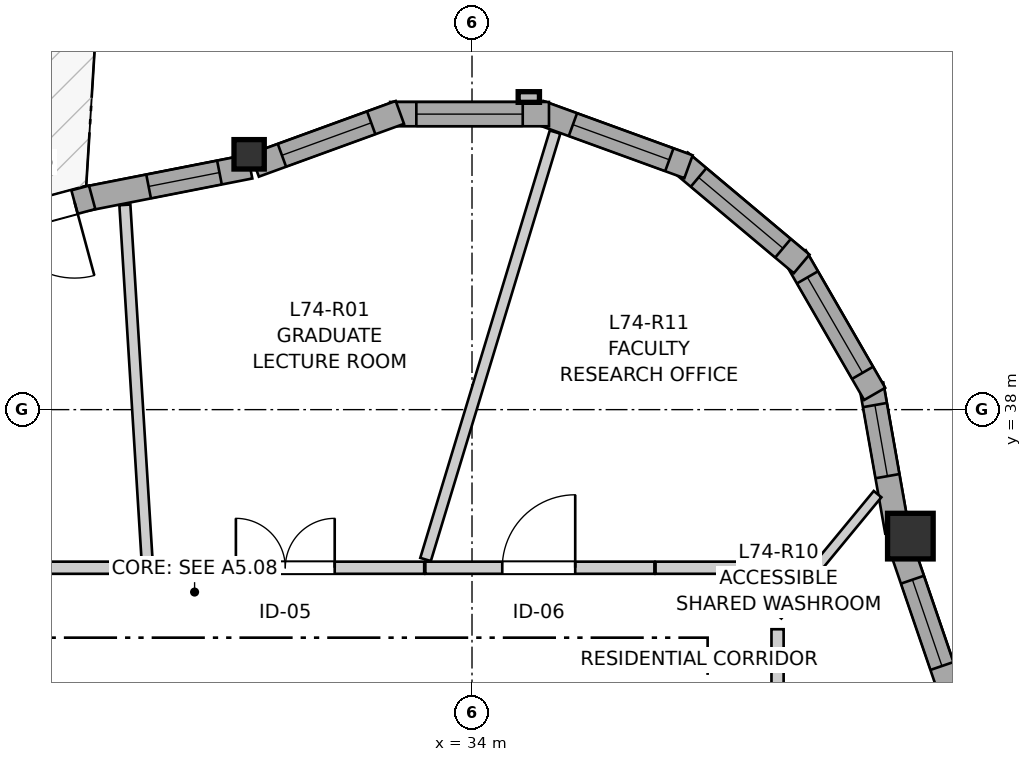
"""IFC4 building model, lengths in metres.
Left out: names, types, materials, properties, quantities, classifications, styles, units other than length and angle.
Written with IfcOpenShell. Run it as: python <this file> out.ifc"""

import sys

from ifc_helpers import new_model, si_unit, direction, frame, frame_2d, origin, origin_2d, place, context, subcontext, project, spatial, rectangle, i_section, extrude, source, transform, mapped, element, fill, save


model = new_model("IFC4")
c1 = context("Model", 3, precision=1e-05, world=origin(), true_north=direction((0.0, 1.0)))
c2 = subcontext(c1, "Body", "Model", "MODEL_VIEW")
j1 = project(units=[si_unit("LENGTHUNIT", "METRE"), si_unit("PLANEANGLEUNIT", "RADIAN")], contexts=[c1])
p1 = place(None, origin())
s1 = spatial("IfcSite", under=j1, at=p1, CompositionType="ELEMENT")
p2 = place(p1, origin())
s2 = spatial("IfcBuilding", under=s1, at=p2, CompositionType="ELEMENT")
p3 = place(p2, frame((0.0, 0.0, 246.8)))
s3 = spatial("IfcBuildingStorey", under=s2, at=p3, CompositionType="ELEMENT", Elevation=246.8)
m1 = source(origin(), c2, "Body", "SweptSolid", [
    extrude(rectangle(XDim=0.6, YDim=0.6, at=origin_2d()), origin(), (0.0, 0.0, 1.0), 2.96),
])
p4 = place(p3, frame((39.768, 36.336, 0.0), z_axis=(0.0, 0.0, 1.0), x_axis=(1.0, 0.0, 0.0)))
e1 = element("IfcColumn", 1, at=p4, inside=s3, PredefinedType="COLUMN", context=c2, shape_type="MappedRepresentation", body=[
    mapped(m1, transform((0.0, 0.0, 0.0), x_axis=(1.0, 0.0, 0.0), y_axis=(0.0, 1.0, 0.0), z_axis=(0.0, 0.0, 1.0), scale=1.0)),
])
m2 = source(origin(), c2, "Body", "SweptSolid", [
    extrude(i_section(OverallWidth=0.398, OverallDepth=0.387, WebThickness=0.019, FlangeThickness=0.03, FilletRadius=0.015, at=origin_2d()), origin(), (0.0, 0.0, 1.0), 2.96),
])
p5 = place(p3, frame((31.067, 41.359, 0.0), z_axis=(0.0, 0.0, 1.0), x_axis=(1.0, 0.0, 0.0)))
e2 = element("IfcColumn", 2, at=p5, inside=s3, PredefinedType="PILASTER", context=c2, shape_type="MappedRepresentation", body=[
    mapped(m2, transform((0.0, 0.0, 0.0), x_axis=(1.0, 0.0, 0.0), y_axis=(0.0, 1.0, 0.0), z_axis=(0.0, 0.0, 1.0), scale=1.0)),
])
p6 = place(p3, frame((40.335, 34.181, 0.0), z_axis=(0.0, 0.0, 1.0), x_axis=(-0.323601383087, 0.946193502865, 0.0)))
e3 = element("IfcWall", 3, at=p6, inside=s3, PredefinedType="SOLIDWALL", context=c2, shape_type="SweptSolid", body=[
    extrude(rectangle(XDim=2.133, YDim=0.32, at=frame_2d((1.066, 0.0))), origin(), (0.0, 0.0, 1.0), 2.58),
])
p7 = place(p6, frame((0.471, 0.0, 0.82)))
e4 = element("IfcOpeningElement", 4, at=p7, cuts=e3, PredefinedType="OPENING", context=c2, shape_type="SweptSolid", body=[
    extrude(rectangle(XDim=1.2, YDim=1.45, at=frame_2d((0.6, 0.725))), frame((0.0, 0.17, 0.0), z_axis=(0.0, -1.0, 0.0), x_axis=(1.0, 0.0, 0.0)), (0.0, 0.0, 1.0), 0.34),
])
p8 = place(p3, frame((39.594, 36.397, 0.0), z_axis=(0.0, 0.0, 1.0), x_axis=(-0.173671780312, 0.984803590937, 0.0)))
e5 = element("IfcWall", 5, at=p8, inside=s3, PredefinedType="SOLIDWALL", context=c2, shape_type="SweptSolid", body=[
    extrude(rectangle(XDim=1.962, YDim=0.32, at=frame_2d((0.981, 0.0))), origin(), (0.0, 0.0, 1.0), 2.58),
])
p9 = place(p8, frame((0.739, 0.0, 0.82)))
e6 = element("IfcOpeningElement", 6, at=p9, cuts=e5, PredefinedType="OPENING", context=c2, shape_type="SweptSolid", body=[
    extrude(rectangle(XDim=0.95, YDim=1.35, at=frame_2d((0.475, 0.675))), frame((0.0, 0.17, 0.0), z_axis=(0.0, -1.0, 0.0), x_axis=(1.0, 0.0, 0.0)), (0.0, 0.0, 1.0), 0.34),
])
p10 = place(p3, frame((39.298, 38.207, 0.0), z_axis=(0.0, 0.0, 1.0), x_axis=(-0.499995423472, 0.866028046028, 0.0)))
e7 = element("IfcWall", 7, at=p10, inside=s3, PredefinedType="SOLIDWALL", context=c2, shape_type="SweptSolid", body=[
    extrude(rectangle(XDim=2.09, YDim=0.32, at=frame_2d((1.045, 0.0))), origin(), (0.0, 0.0, 1.0), 2.58),
])
p11 = place(p10, frame((0.32, 0.0, 0.82)))
e8 = element("IfcOpeningElement", 8, at=p11, cuts=e7, PredefinedType="OPENING", context=c2, shape_type="SweptSolid", body=[
    extrude(rectangle(XDim=1.45, YDim=1.25, at=frame_2d((0.725, 0.625))), frame((0.0, 0.17, 0.0), z_axis=(0.0, -1.0, 0.0), x_axis=(1.0, 0.0, 0.0)), (0.0, 0.0, 1.0), 0.34),
])
p12 = place(p3, frame((38.337, 39.917, 0.0), z_axis=(0.0, 0.0, 1.0), x_axis=(-0.766024572719, 0.642811289563, 0.0)))
e9 = element("IfcWall", 9, at=p12, inside=s3, PredefinedType="SOLIDWALL", context=c2, shape_type="SweptSolid", body=[
    extrude(rectangle(XDim=2.09, YDim=0.32, at=frame_2d((1.045, 0.0))), origin(), (0.0, 0.0, 1.0), 2.58),
])
p13 = place(p12, frame((0.32, 0.0, 0.82)))
e10 = element("IfcOpeningElement", 10, at=p13, cuts=e9, PredefinedType="OPENING", context=c2, shape_type="SweptSolid", body=[
    extrude(rectangle(XDim=1.45, YDim=1.25, at=frame_2d((0.725, 0.625))), frame((0.0, 0.17, 0.0), z_axis=(0.0, -1.0, 0.0), x_axis=(1.0, 0.0, 0.0)), (0.0, 0.0, 1.0), 0.34),
])
p14 = place(p3, frame((36.848, 41.196, 0.0), z_axis=(0.0, 0.0, 1.0), x_axis=(-0.93973543134, 0.341902499383, 0.0)))
e11 = element("IfcWall", 11, at=p14, inside=s3, PredefinedType="SOLIDWALL", context=c2, shape_type="SweptSolid", body=[
    extrude(rectangle(XDim=2.09, YDim=0.32, at=frame_2d((1.045, 0.0))), origin(), (0.0, 0.0, 1.0), 2.58),
])
p15 = place(p14, frame((0.269, 0.0, 0.82)))
e12 = element("IfcOpeningElement", 12, at=p15, cuts=e11, PredefinedType="OPENING", context=c2, shape_type="SweptSolid", body=[
    extrude(rectangle(XDim=1.35, YDim=1.45, at=frame_2d((0.675, 0.725))), frame((0.0, 0.17, 0.0), z_axis=(0.0, -1.0, 0.0), x_axis=(1.0, 0.0, 0.0)), (0.0, 0.0, 1.0), 0.34),
])
p16 = place(p3, frame((35.013, 41.888, 0.0), z_axis=(0.0, 0.0, 1.0), x_axis=(-1.0, 0.0, 0.0)))
e13 = element("IfcWall", 13, at=p16, inside=s3, PredefinedType="SOLIDWALL", context=c2, shape_type="SweptSolid", body=[
    extrude(rectangle(XDim=2.09, YDim=0.32, at=frame_2d((1.045, 0.0))), origin(), (0.0, 0.0, 1.0), 2.58),
])
p17 = place(p16, frame((0.345, 0.0, 0.82)))
e14 = element("IfcOpeningElement", 14, at=p17, cuts=e13, PredefinedType="OPENING", context=c2, shape_type="SweptSolid", body=[
    extrude(rectangle(XDim=1.4, YDim=1.35, at=frame_2d((0.7, 0.675))), frame((0.0, 0.17, 0.0), z_axis=(0.0, -1.0, 0.0), x_axis=(1.0, 0.0, 0.0)), (0.0, 0.0, 1.0), 0.34),
])
p18 = place(p3, frame((33.051, 41.91, 0.0), z_axis=(0.0, 0.0, 1.0), x_axis=(-0.939730268502, -0.341916689358, 0.0)))
e15 = element("IfcWall", 15, at=p18, inside=s3, PredefinedType="SOLIDWALL", context=c2, shape_type="SweptSolid", body=[
    extrude(rectangle(XDim=2.032, YDim=0.32, at=frame_2d((1.016, 0.0))), origin(), (0.0, 0.0, 1.0), 2.58),
])
p19 = place(p18, frame((0.401, 0.0, 0.82)))
e16 = element("IfcOpeningElement", 16, at=p19, cuts=e15, PredefinedType="OPENING", context=c2, shape_type="SweptSolid", body=[
    extrude(rectangle(XDim=1.25, YDim=1.35, at=frame_2d((0.625, 0.675))), frame((0.0, 0.17, 0.0), z_axis=(0.0, -1.0, 0.0), x_axis=(1.0, 0.0, 0.0)), (0.0, 0.0, 1.0), 0.34),
])
p20 = place(p3, frame((31.079, 41.198, 0.0), z_axis=(0.0, 0.0, 1.0), x_axis=(-0.981223354781, -0.192874902544, 0.0)))
e17 = element("IfcWall", 17, at=p20, inside=s3, PredefinedType="SOLIDWALL", context=c2, shape_type="SweptSolid", body=[
    extrude(rectangle(XDim=2.202, YDim=0.32, at=frame_2d((1.101, 0.0))), origin(), (0.0, 0.0, 1.0), 2.58),
])
p21 = place(p20, frame((0.409, 0.0, 0.82)))
e18 = element("IfcOpeningElement", 18, at=p21, cuts=e17, PredefinedType="OPENING", context=c2, shape_type="SweptSolid", body=[
    extrude(rectangle(XDim=0.95, YDim=1.35, at=frame_2d((0.475, 0.675))), frame((0.0, 0.17, 0.0), z_axis=(0.0, -1.0, 0.0), x_axis=(1.0, 0.0, 0.0)), (0.0, 0.0, 1.0), 0.34),
])
p22 = place(p3, frame((29.002, 40.793, 0.0), z_axis=(0.0, 0.0, 1.0), x_axis=(-0.965467637734, -0.260523013357, 0.0)))
e19 = element("IfcWall", 19, at=p22, inside=s3, PredefinedType="SOLIDWALL", context=c2, shape_type="SweptSolid", body=[
    extrude(rectangle(XDim=2.087, YDim=0.32, at=frame_2d((1.043, 0.0))), origin(), (0.0, 0.0, 1.0), 2.58),
])
p23 = place(p22, frame((0.24, 0.0, 0.0)))
e20 = element("IfcOpeningElement", 20, at=p23, cuts=e19, PredefinedType="OPENING", context=c2, shape_type="SweptSolid", body=[
    extrude(rectangle(XDim=1.0, YDim=2.1, at=frame_2d((0.5, 1.05))), frame((0.0, 0.17, 0.0), z_axis=(0.0, -1.0, 0.0), x_axis=(1.0, 0.0, 0.0)), (0.0, 0.0, 1.0), 0.34),
])
p24 = place(p3, frame((24.3, 35.92, 0.0), z_axis=(0.0, 0.0, 1.0), x_axis=(1.0, 0.0, 0.0)))
e21 = element("IfcWall", 21, at=p24, inside=s3, PredefinedType="PARTITIONING", context=c2, shape_type="SweptSolid", body=[
    extrude(rectangle(XDim=5.446, YDim=0.16, at=frame_2d((2.723, 0.0))), origin(), (0.0, 0.0, 1.0), 2.96),
])
p25 = place(p24, frame((2.236, 0.0, 0.0)))
e22 = element("IfcOpeningElement", 22, at=p25, cuts=e21, PredefinedType="OPENING", context=c2, shape_type="SweptSolid", body=[
    extrude(rectangle(XDim=0.96, YDim=2.1, at=frame_2d((0.48, 1.05))), frame((0.0, 0.09, 0.0), z_axis=(0.0, -1.0, 0.0), x_axis=(1.0, 0.0, 0.0)), (0.0, 0.0, 1.0), 0.18),
])
p26 = place(p3, frame((29.761, 35.92, 0.0), z_axis=(0.0, 0.0, 1.0), x_axis=(1.0, 0.0, 0.0)))
e23 = element("IfcWall", 23, at=p26, inside=s3, PredefinedType="PARTITIONING", context=c2, shape_type="SweptSolid", body=[
    extrude(rectangle(XDim=3.61, YDim=0.16, at=frame_2d((1.805, 0.0))), origin(), (0.0, 0.0, 1.0), 2.96),
])
p27 = place(p26, frame((1.133, 0.0, 0.0)))
e24 = element("IfcOpeningElement", 24, at=p27, cuts=e23, PredefinedType="OPENING", context=c2, shape_type="SweptSolid", body=[
    extrude(rectangle(XDim=1.3, YDim=2.1, at=frame_2d((0.65, 1.05))), frame((0.0, 0.09, 0.0), z_axis=(0.0, -1.0, 0.0), x_axis=(1.0, 0.0, 0.0)), (0.0, 0.0, 1.0), 0.18),
])
p28 = place(p3, frame((33.386, 35.92, 0.0), z_axis=(0.0, 0.0, 1.0), x_axis=(1.0, 0.0, 0.0)))
e25 = element("IfcWall", 25, at=p28, inside=s3, PredefinedType="PARTITIONING", context=c2, shape_type="SweptSolid", body=[
    extrude(rectangle(XDim=3.014, YDim=0.16, at=frame_2d((1.507, 0.0))), origin(), (0.0, 0.0, 1.0), 2.598),
])
p29 = place(p28, frame((1.012, 0.0, 0.0)))
e26 = element("IfcOpeningElement", 26, at=p29, cuts=e25, PredefinedType="OPENING", context=c2, shape_type="SweptSolid", body=[
    extrude(rectangle(XDim=0.96, YDim=2.1, at=frame_2d((0.48, 1.05))), frame((0.0, 0.09, 0.0), z_axis=(0.0, -1.0, 0.0), x_axis=(1.0, 0.0, 0.0)), (0.0, 0.0, 1.0), 0.18),
])
p30 = place(p3, frame((33.389, 36.029, 0.0), z_axis=(0.0, 0.0, 1.0), x_axis=(0.289965875663, 0.957036985153, 0.0)))
e27 = element("IfcWall", 27, at=p30, inside=s3, PredefinedType="PARTITIONING", context=c2, shape_type="SweptSolid", body=[
    extrude(rectangle(XDim=5.875, YDim=0.145, at=frame_2d((2.938, 0.0))), origin(), (0.0, 0.0, 1.0), 2.96),
])
p31 = place(p3, frame((29.433, 40.694, 0.0), z_axis=(0.0, 0.0, 1.0), x_axis=(0.062358842424, -0.998053793526, 0.0)))
e28 = element("IfcWall", 28, at=p31, inside=s3, PredefinedType="PARTITIONING", context=c2, shape_type="SweptSolid", body=[
    extrude(rectangle(XDim=4.69, YDim=0.145, at=frame_2d((2.345, 0.0))), origin(), (0.0, 0.0, 1.0), 2.96),
])
p32 = place(p3, frame((38.02, 35.294, 0.0), z_axis=(0.0, 0.0, 1.0), x_axis=(0.636518208935, 0.771261673943, 0.0)))
e29 = element("IfcWall", 29, at=p32, inside=s3, PredefinedType="PARTITIONING", context=c2, shape_type="SweptSolid", body=[
    extrude(rectangle(XDim=2.067, YDim=0.13, at=frame_2d((1.034, 0.0))), origin(), (0.0, 0.0, 1.0), 2.96),
])
p33 = place(p3, frame((36.415, 35.92, 0.0), z_axis=(0.0, 0.0, 1.0), x_axis=(1.0, 0.0, 0.0)))
e30 = element("IfcWall", 30, at=p33, inside=s3, PredefinedType="PARTITIONING", context=c2, shape_type="SweptSolid", body=[
    extrude(rectangle(XDim=1.605, YDim=0.16, at=frame_2d((0.802, 0.0))), origin(), (0.0, 0.0, 1.0), 2.598),
])
p34 = place(p3, frame((38.02, 34.315, 0.0), z_axis=(0.0, 0.0, 1.0), x_axis=(0.0, 1.0, 0.0)))
e31 = element("IfcWall", 31, at=p34, inside=s3, PredefinedType="PARTITIONING", context=c2, shape_type="SweptSolid", body=[
    extrude(rectangle(XDim=0.796, YDim=0.16, at=frame_2d((0.398, 0.0))), origin(), (0.0, 0.0, 1.0), 2.96),
])
p35 = place(p3, frame((38.02, 35.423, 0.0), z_axis=(0.0, 0.0, 1.0), x_axis=(0.0, 1.0, 0.0)))
e32 = element("IfcWall", 32, at=p35, inside=s3, PredefinedType="PARTITIONING", context=c2, shape_type="SweptSolid", body=[
    extrude(rectangle(XDim=0.497, YDim=0.16, at=frame_2d((0.249, 0.0))), origin(), (0.0, 0.0, 1.0), 2.96),
])
m3 = source(origin(), c2, "Body", "SweptSolid", [
    extrude(rectangle(XDim=1.2, YDim=1.45, at=frame_2d((0.6, 0.725))), frame((0.0, 0.03, 0.0), z_axis=(0.0, -1.0, 0.0), x_axis=(1.0, 0.0, 0.0)), (0.0, 0.0, 1.0), 0.06),
])
p36 = place(p7, origin())
e33 = element("IfcWindow", 33, at=p36, inside=s3, PartitioningType="SINGLE_PANEL", PredefinedType="WINDOW", context=c2, shape_type="MappedRepresentation", body=[
    mapped(m3, transform((0.0, 0.0, 0.0), x_axis=(1.0, 0.0, 0.0), y_axis=(0.0, 1.0, 0.0), z_axis=(0.0, 0.0, 1.0), scale=1.0)),
])
fill(e4, e33)
m4 = source(origin(), c2, "Body", "SweptSolid", [
    extrude(rectangle(XDim=0.95, YDim=1.35, at=frame_2d((0.475, 0.675))), frame((0.0, 0.03, 0.0), z_axis=(0.0, -1.0, 0.0), x_axis=(1.0, 0.0, 0.0)), (0.0, 0.0, 1.0), 0.06),
])
p37 = place(p9, origin())
e34 = element("IfcWindow", 34, at=p37, inside=s3, PartitioningType="SINGLE_PANEL", PredefinedType="WINDOW", context=c2, shape_type="MappedRepresentation", body=[
    mapped(m4, transform((0.0, 0.0, 0.0), x_axis=(1.0, 0.0, 0.0), y_axis=(0.0, 1.0, 0.0), z_axis=(0.0, 0.0, 1.0), scale=1.0)),
])
fill(e6, e34)
m5 = source(origin(), c2, "Body", "SweptSolid", [
    extrude(rectangle(XDim=1.45, YDim=1.25, at=frame_2d((0.725, 0.625))), frame((0.0, 0.03, 0.0), z_axis=(0.0, -1.0, 0.0), x_axis=(1.0, 0.0, 0.0)), (0.0, 0.0, 1.0), 0.06),
])
p38 = place(p11, origin())
e35 = element("IfcWindow", 35, at=p38, inside=s3, PartitioningType="SINGLE_PANEL", PredefinedType="WINDOW", context=c2, shape_type="MappedRepresentation", body=[
    mapped(m5, transform((0.0, 0.0, 0.0), x_axis=(1.0, 0.0, 0.0), y_axis=(0.0, 1.0, 0.0), z_axis=(0.0, 0.0, 1.0), scale=1.0)),
])
fill(e8, e35)
p39 = place(p13, origin())
e36 = element("IfcWindow", 36, at=p39, inside=s3, PartitioningType="SINGLE_PANEL", PredefinedType="WINDOW", context=c2, shape_type="MappedRepresentation", body=[
    mapped(m5, transform((0.0, 0.0, 0.0), x_axis=(1.0, 0.0, 0.0), y_axis=(0.0, 1.0, 0.0), z_axis=(0.0, 0.0, 1.0), scale=1.0)),
])
fill(e10, e36)
m6 = source(origin(), c2, "Body", "SweptSolid", [
    extrude(rectangle(XDim=1.35, YDim=1.45, at=frame_2d((0.675, 0.725))), frame((0.0, 0.03, 0.0), z_axis=(0.0, -1.0, 0.0), x_axis=(1.0, 0.0, 0.0)), (0.0, 0.0, 1.0), 0.06),
])
p40 = place(p15, origin())
e37 = element("IfcWindow", 37, at=p40, inside=s3, PartitioningType="SINGLE_PANEL", PredefinedType="WINDOW", context=c2, shape_type="MappedRepresentation", body=[
    mapped(m6, transform((0.0, 0.0, 0.0), x_axis=(1.0, 0.0, 0.0), y_axis=(0.0, 1.0, 0.0), z_axis=(0.0, 0.0, 1.0), scale=1.0)),
])
fill(e12, e37)
m7 = source(origin(), c2, "Body", "SweptSolid", [
    extrude(rectangle(XDim=1.4, YDim=1.35, at=frame_2d((0.7, 0.675))), frame((0.0, 0.03, 0.0), z_axis=(0.0, -1.0, 0.0), x_axis=(1.0, 0.0, 0.0)), (0.0, 0.0, 1.0), 0.06),
])
p41 = place(p17, origin())
e38 = element("IfcWindow", 38, at=p41, inside=s3, PartitioningType="SINGLE_PANEL", PredefinedType="WINDOW", context=c2, shape_type="MappedRepresentation", body=[
    mapped(m7, transform((0.0, 0.0, 0.0), x_axis=(1.0, 0.0, 0.0), y_axis=(0.0, 1.0, 0.0), z_axis=(0.0, 0.0, 1.0), scale=1.0)),
])
fill(e14, e38)
m8 = source(origin(), c2, "Body", "SweptSolid", [
    extrude(rectangle(XDim=1.25, YDim=1.35, at=frame_2d((0.625, 0.675))), frame((0.0, 0.03, 0.0), z_axis=(0.0, -1.0, 0.0), x_axis=(1.0, 0.0, 0.0)), (0.0, 0.0, 1.0), 0.06),
])
p42 = place(p19, origin())
e39 = element("IfcWindow", 39, at=p42, inside=s3, PartitioningType="SINGLE_PANEL", PredefinedType="WINDOW", context=c2, shape_type="MappedRepresentation", body=[
    mapped(m8, transform((0.0, 0.0, 0.0), x_axis=(1.0, 0.0, 0.0), y_axis=(0.0, 1.0, 0.0), z_axis=(0.0, 0.0, 1.0), scale=1.0)),
])
fill(e16, e39)
p43 = place(p21, origin())
e40 = element("IfcWindow", 40, at=p43, inside=s3, PartitioningType="SINGLE_PANEL", PredefinedType="WINDOW", context=c2, shape_type="MappedRepresentation", body=[
    mapped(m4, transform((0.0, 0.0, 0.0), x_axis=(1.0, 0.0, 0.0), y_axis=(0.0, 1.0, 0.0), z_axis=(0.0, 0.0, 1.0), scale=1.0)),
])
fill(e18, e40)
m9 = source(origin(), c2, "Body", "SweptSolid", [
    extrude(rectangle(XDim=1.0, YDim=2.1, at=frame_2d((0.5, 1.05))), frame((0.0, 0.025, 0.0), z_axis=(0.0, -1.0, 0.0), x_axis=(1.0, 0.0, 0.0)), (0.0, 0.0, 1.0), 0.05),
])
p44 = place(p23, origin())
e41 = element("IfcDoor", 41, at=p44, inside=s3, OperationType="SINGLE_SWING_LEFT", PredefinedType="DOOR", context=c2, shape_type="MappedRepresentation", body=[
    mapped(m9, transform((0.0, 0.0, 0.0), x_axis=(1.0, 0.0, 0.0), y_axis=(0.0, 1.0, 0.0), z_axis=(0.0, 0.0, 1.0), scale=1.0)),
])
fill(e20, e41)
m10 = source(origin(), c2, "Body", "SweptSolid", [
    extrude(rectangle(XDim=1.3, YDim=2.1, at=frame_2d((0.65, 1.05))), frame((0.0, 0.025, 0.0), z_axis=(0.0, -1.0, 0.0), x_axis=(1.0, 0.0, 0.0)), (0.0, 0.0, 1.0), 0.05),
])
p45 = place(p27, origin())
e42 = element("IfcDoor", 42, at=p45, inside=s3, OperationType="DOUBLE_DOOR_SINGLE_SWING", PredefinedType="DOOR", context=c2, shape_type="MappedRepresentation", body=[
    mapped(m10, transform((0.0, 0.0, 0.0), x_axis=(1.0, 0.0, 0.0), y_axis=(0.0, 1.0, 0.0), z_axis=(0.0, 0.0, 1.0), scale=1.0)),
])
fill(e24, e42)
m11 = source(origin(), c2, "Body", "SweptSolid", [
    extrude(rectangle(XDim=0.96, YDim=2.1, at=frame_2d((0.48, 1.05))), frame((0.0, 0.025, 0.0), z_axis=(0.0, -1.0, 0.0), x_axis=(1.0, 0.0, 0.0)), (0.0, 0.0, 1.0), 0.05),
])
p46 = place(p29, origin())
e43 = element("IfcDoor", 43, at=p46, inside=s3, OperationType="SINGLE_SWING_RIGHT", PredefinedType="DOOR", context=c2, shape_type="MappedRepresentation", body=[
    mapped(m11, transform((0.0, 0.0, 0.0), x_axis=(1.0, 0.0, 0.0), y_axis=(0.0, 1.0, 0.0), z_axis=(0.0, 0.0, 1.0), scale=1.0)),
])
fill(e26, e43)
save(model, sys.argv[1])
